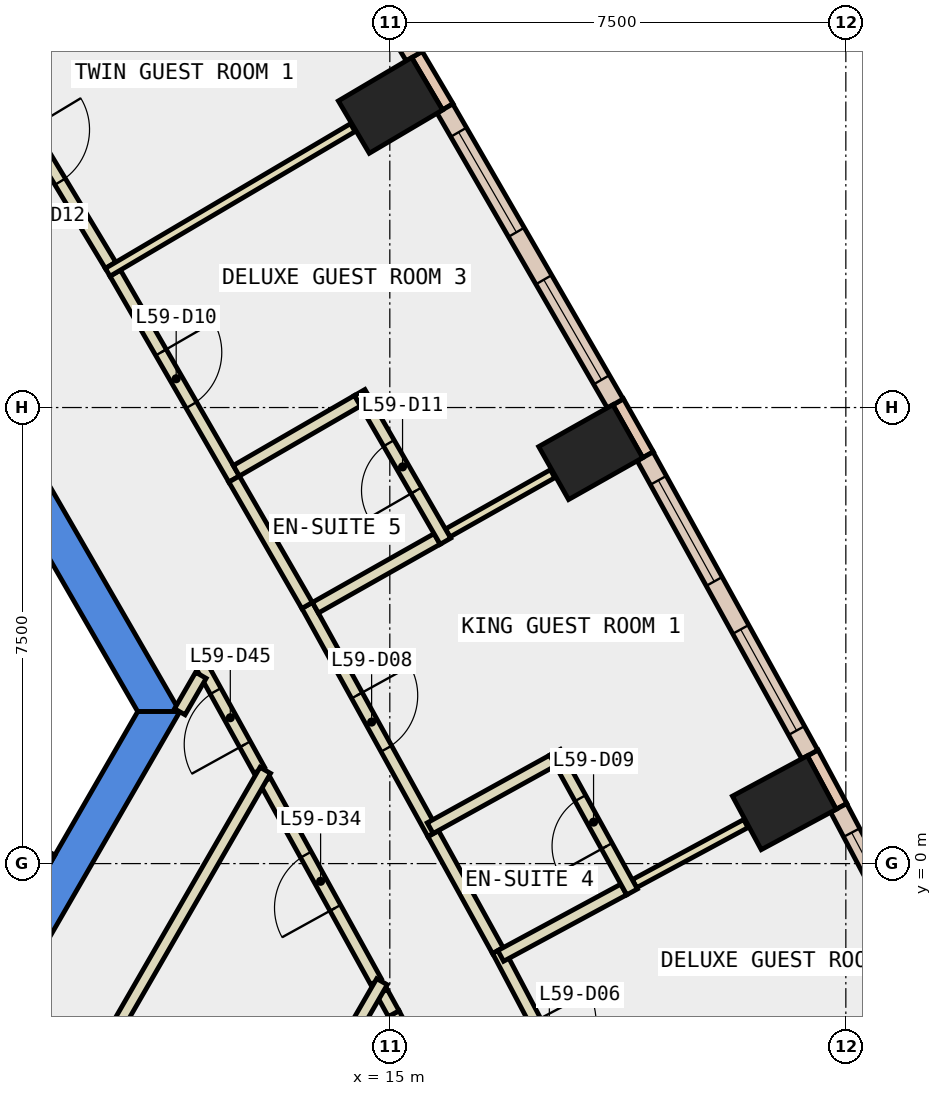
"""IFC4 building model, lengths in metres.
Left out: names, types, materials, properties, quantities, classifications, styles, units other than length and angle.
Written with IfcOpenShell. Run it as: python <this file> out.ifc"""

import sys

from ifc_helpers import new_model, si_unit, direction, frame, frame_2d, origin, origin_2d, place, context, subcontext, project, spatial, polyline, rectangle, outline, extrude, element, fill, save


model = new_model("IFC4")
c1 = context("Model", 3, precision=1e-05, world=origin(), true_north=direction((0.0, 1.0)))
c2 = subcontext(c1, "Body", "Model", "MODEL_VIEW")
j1 = project(units=[si_unit("LENGTHUNIT", "METRE"), si_unit("PLANEANGLEUNIT", "RADIAN")], contexts=[c1])
p1 = place(None, origin())
s1 = spatial("IfcSite", under=j1, at=p1, CompositionType="ELEMENT")
p2 = place(p1, origin())
s2 = spatial("IfcBuilding", under=s1, at=p2, CompositionType="ELEMENT")
p3 = place(p2, frame((0.0, 0.0, 259.4)))
s3 = spatial("IfcBuildingStorey", under=s2, at=p3, CompositionType="ELEMENT", Elevation=259.4)
for number, where, z_axis, x_axis in (
    (1, (21.488, 1.001, -0.34), (0.0, 0.0, 1.0), (-0.474, 0.881, 0.0)),
    (2, (18.304, 6.766, -0.34), (0.0, 0.0, 1.0), (-0.491, 0.871, 0.0)),
    (3, (15.011, 12.468, -0.34), (0.0, 0.0, 1.0), (-0.509, 0.861, 0.0)),
):
    element("IfcColumn", number, at=place(p3, frame(where, z_axis=z_axis, x_axis=x_axis)), inside=s3, PredefinedType="COLUMN", context=c2, shape_type="SweptSolid", body=[
        extrude(rectangle(XDim=1.0, YDim=1.4, at=origin_2d()), origin(), (0.0, 0.0, 1.0), 3.6),
    ])
p4 = place(p3, frame((0.0, 0.0, -0.34)))
e4 = element("IfcWall", 4, at=p4, inside=s3, PredefinedType="SHEAR", context=c2, shape_type="SweptSolid", body=[
    extrude(outline(polyline([(6.786, 10.747), (6.266, 10.447), (10.854, 2.5), (11.547, 2.5), (6.786, 10.747)])), origin(), (0.0, 0.0, 1.0), 3.6),
])
p5 = place(p3, frame((0.0, 0.0, -0.34)))
e5 = element("IfcWall", 5, at=p5, inside=s3, PredefinedType="SHEAR", context=c2, shape_type="SweptSolid", body=[
    extrude(outline(polyline([(5.774, -7.5), (11.547, 2.5), (10.854, 2.5), (5.427, -6.9), (5.774, -7.5)])), origin(), (0.0, 0.0, 1.0), 3.6),
])
for number, where, z_axis, x_axis in (
    (6, (22.429, 0.94, 0.0), (0.0, 0.0, 1.0), (-0.474, 0.881, 0.0)),
    (7, (19.247, 6.723, 0.0), (0.0, 0.0, 1.0), (-0.492, 0.871, 0.0)),
):
    element("IfcWall", number, at=place(p3, frame(where, z_axis=z_axis, x_axis=x_axis)), inside=s3, PredefinedType="STANDARD", context=c2, shape_type="SweptSolid", body=[
        extrude(rectangle(XDim=1.0, YDim=0.2, at=frame_2d((0.5, 0.0))), origin(), (0.0, 0.0, 1.0), 3.26),
    ])
p6 = place(p3, frame((15.954, 12.445, 0.0), z_axis=(0.0, 0.0, 1.0), x_axis=(-0.508268432768, 0.861198699634, 0.0)))
e8 = element("IfcWall", 8, at=p6, inside=s3, PredefinedType="STANDARD", context=c2, shape_type="SweptSolid", body=[
    extrude(rectangle(XDim=1.0, YDim=0.2, at=frame_2d((0.5, 0.0))), origin(), (0.0, 0.0, 1.0), 3.26),
])
p7 = place(p3, frame((25.012, -4.07, 0.0), z_axis=(0.0, 0.0, 1.0), x_axis=(-0.466663589714, 0.884434900959, 0.0)))
e9 = element("IfcWall", 9, at=p7, inside=s3, PredefinedType="STANDARD", context=c2, shape_type="SweptSolid", body=[
    extrude(rectangle(XDim=5.638, YDim=0.3, at=frame_2d((2.819, 0.0))), origin(), (0.0, 0.0, 1.0), 3.26),
])
p8 = place(p7, frame((0.459, 0.0, 0.9)))
e10 = element("IfcOpeningElement", 10, at=p8, cuts=e9, PredefinedType="OPENING", context=c2, shape_type="SweptSolid", body=[
    extrude(rectangle(XDim=1.9, YDim=2.0, at=frame_2d((0.95, 1.0))), frame((0.0, 0.16, 0.0), z_axis=(0.0, -1.0, 0.0), x_axis=(1.0, 0.0, 0.0)), (0.0, 0.0, 1.0), 0.32),
])
p9 = place(p7, frame((3.278, 0.0, 0.9)))
e11 = element("IfcOpeningElement", 11, at=p9, cuts=e9, PredefinedType="OPENING", context=c2, shape_type="SweptSolid", body=[
    extrude(rectangle(XDim=1.9, YDim=2.0, at=frame_2d((0.95, 1.0))), frame((0.0, 0.16, 0.0), z_axis=(0.0, -1.0, 0.0), x_axis=(1.0, 0.0, 0.0)), (0.0, 0.0, 1.0), 0.32),
])
p10 = place(p3, frame((21.907, 1.794, 0.0), z_axis=(0.0, 0.0, 1.0), x_axis=(-0.483469062695, 0.875361448441, 0.0)))
e12 = element("IfcWall", 12, at=p10, inside=s3, PredefinedType="STANDARD", context=c2, shape_type="SweptSolid", body=[
    extrude(rectangle(XDim=5.601, YDim=0.3, at=frame_2d((2.801, 0.0))), origin(), (0.0, 0.0, 1.0), 3.26),
])
p11 = place(p10, frame((0.45, 0.0, 0.9)))
e13 = element("IfcOpeningElement", 13, at=p11, cuts=e12, PredefinedType="OPENING", context=c2, shape_type="SweptSolid", body=[
    extrude(rectangle(XDim=1.9, YDim=2.0, at=frame_2d((0.95, 1.0))), frame((0.0, 0.16, 0.0), z_axis=(0.0, -1.0, 0.0), x_axis=(1.0, 0.0, 0.0)), (0.0, 0.0, 1.0), 0.32),
])
p12 = place(p10, frame((3.251, 0.0, 0.9)))
e14 = element("IfcOpeningElement", 14, at=p12, cuts=e12, PredefinedType="OPENING", context=c2, shape_type="SweptSolid", body=[
    extrude(rectangle(XDim=1.9, YDim=2.0, at=frame_2d((0.95, 1.0))), frame((0.0, 0.16, 0.0), z_axis=(0.0, -1.0, 0.0), x_axis=(1.0, 0.0, 0.0)), (0.0, 0.0, 1.0), 0.32),
])
p13 = place(p3, frame((18.708, 7.566, 0.0), z_axis=(0.0, 0.0, 1.0), x_axis=(-0.500089564757, 0.865973687372, 0.0)))
e15 = element("IfcWall", 15, at=p13, inside=s3, PredefinedType="STANDARD", context=c2, shape_type="SweptSolid", body=[
    extrude(rectangle(XDim=5.603, YDim=0.3, at=frame_2d((2.802, 0.0))), origin(), (0.0, 0.0, 1.0), 3.26),
])
p14 = place(p13, frame((0.451, 0.0, 0.9)))
e16 = element("IfcOpeningElement", 16, at=p14, cuts=e15, PredefinedType="OPENING", context=c2, shape_type="SweptSolid", body=[
    extrude(rectangle(XDim=1.9, YDim=2.0, at=frame_2d((0.95, 1.0))), frame((0.0, 0.16, 0.0), z_axis=(0.0, -1.0, 0.0), x_axis=(1.0, 0.0, 0.0)), (0.0, 0.0, 1.0), 0.32),
])
p15 = place(p13, frame((3.252, 0.0, 0.9)))
e17 = element("IfcOpeningElement", 17, at=p15, cuts=e15, PredefinedType="OPENING", context=c2, shape_type="SweptSolid", body=[
    extrude(rectangle(XDim=1.9, YDim=2.0, at=frame_2d((0.95, 1.0))), frame((0.0, 0.16, 0.0), z_axis=(0.0, -1.0, 0.0), x_axis=(1.0, 0.0, 0.0)), (0.0, 0.0, 1.0), 0.32),
])
p16 = place(p3, frame((15.399, 13.277, 0.0), z_axis=(0.0, 0.0, 1.0), x_axis=(-0.516269519619, 0.856426169096, 0.0)))
e18 = element("IfcWall", 18, at=p16, inside=s3, PredefinedType="STANDARD", context=c2, shape_type="SweptSolid", body=[
    extrude(rectangle(XDim=5.603, YDim=0.3, at=frame_2d((2.802, 0.0))), origin(), (0.0, 0.0, 1.0), 3.26),
])
p17 = place(p16, frame((0.451, 0.0, 0.9)))
e19 = element("IfcOpeningElement", 19, at=p17, cuts=e18, PredefinedType="OPENING", context=c2, shape_type="SweptSolid", body=[
    extrude(rectangle(XDim=1.9, YDim=2.0, at=frame_2d((0.95, 1.0))), frame((0.0, 0.16, 0.0), z_axis=(0.0, -1.0, 0.0), x_axis=(1.0, 0.0, 0.0)), (0.0, 0.0, 1.0), 0.32),
])
p18 = place(p16, frame((3.253, 0.0, 0.9)))
e20 = element("IfcOpeningElement", 20, at=p18, cuts=e18, PredefinedType="OPENING", context=c2, shape_type="SweptSolid", body=[
    extrude(rectangle(XDim=1.9, YDim=2.0, at=frame_2d((0.95, 1.0))), frame((0.0, 0.16, 0.0), z_axis=(0.0, -1.0, 0.0), x_axis=(1.0, 0.0, 0.0)), (0.0, 0.0, 1.0), 0.32),
])
p19 = place(p3, frame((12.854, 1.535, 0.0), z_axis=(0.0, 0.0, 1.0), x_axis=(-0.483730980407, 0.875216738068, 0.0)))
e21 = element("IfcWall", 21, at=p19, inside=s3, PredefinedType="PARTITIONING", context=c2, shape_type="SweptSolid", body=[
    extrude(rectangle(XDim=1.974, YDim=0.2, at=frame_2d((0.987, 0.0))), origin(), (0.0, 0.0, 1.0), 3.26),
])
p20 = place(p19, frame((0.487, 0.0, 0.0)))
e22 = element("IfcOpeningElement", 22, at=p20, cuts=e21, PredefinedType="OPENING", context=c2, shape_type="SweptSolid", body=[
    extrude(rectangle(XDim=1.0, YDim=2.1, at=frame_2d((0.5, 1.05))), frame((0.0, 0.11, 0.0), z_axis=(0.0, -1.0, 0.0), x_axis=(1.0, 0.0, 0.0)), (0.0, 0.0, 1.0), 0.22),
])
p21 = place(p3, frame((11.893, 3.097, 0.0), z_axis=(0.0, 0.0, 1.0), x_axis=(-0.500911294014, -0.865498628265, 0.0)))
e23 = element("IfcWall", 23, at=p21, inside=s3, PredefinedType="PARTITIONING", context=c2, shape_type="SweptSolid", body=[
    extrude(rectangle(XDim=0.693, YDim=0.2, at=frame_2d((0.347, 0.0))), origin(), (0.0, 0.0, 1.0), 3.26),
])
p22 = place(p3, frame((14.773, -1.941, 0.0), z_axis=(0.0, 0.0, 1.0), x_axis=(-0.483431586589, 0.875382145744, 0.0)))
e24 = element("IfcWall", 24, at=p22, inside=s3, PredefinedType="PARTITIONING", context=c2, shape_type="SweptSolid", body=[
    extrude(rectangle(XDim=3.771, YDim=0.2, at=frame_2d((1.885, 0.0))), origin(), (0.0, 0.0, 1.0), 3.26),
])
p23 = place(p22, frame((1.385, 0.0, 0.0)))
e25 = element("IfcOpeningElement", 25, at=p23, cuts=e24, PredefinedType="OPENING", context=c2, shape_type="SweptSolid", body=[
    extrude(rectangle(XDim=1.0, YDim=2.1, at=frame_2d((0.5, 1.05))), frame((0.0, 0.11, 0.0), z_axis=(0.0, -1.0, 0.0), x_axis=(1.0, 0.0, 0.0)), (0.0, 0.0, 1.0), 0.22),
])
p24 = place(p3, frame((16.667, -5.505, 0.0), z_axis=(0.0, 0.0, 1.0), x_axis=(-0.466812680399, 0.884356218624, 0.0)))
e26 = element("IfcWall", 26, at=p24, inside=s3, PredefinedType="PARTITIONING", context=c2, shape_type="SweptSolid", body=[
    extrude(rectangle(XDim=3.434, YDim=0.2, at=frame_2d((1.717, 0.0))), origin(), (0.0, 0.0, 1.0), 3.26),
])
p25 = place(p24, frame((1.217, 0.0, 0.0)))
e27 = element("IfcOpeningElement", 27, at=p25, cuts=e26, PredefinedType="OPENING", context=c2, shape_type="SweptSolid", body=[
    extrude(rectangle(XDim=1.0, YDim=2.1, at=frame_2d((0.5, 1.05))), frame((0.0, 0.11, 0.0), z_axis=(0.0, -1.0, 0.0), x_axis=(1.0, 0.0, 0.0)), (0.0, 0.0, 1.0), 0.22),
])
p26 = place(p3, frame((15.064, -2.468, 0.0), z_axis=(0.0, 0.0, 1.0), x_axis=(-0.482338449744, 0.875984942735, 0.0)))
e28 = element("IfcWall", 28, at=p26, inside=s3, PredefinedType="PARTITIONING", context=c2, shape_type="SweptSolid", body=[
    extrude(rectangle(XDim=0.402, YDim=0.2, at=frame_2d((0.201, 0.0))), origin(), (0.0, 0.0, 1.0), 3.26),
])
p27 = place(p3, frame((16.778, -1.429, 0.0), z_axis=(0.0, 0.0, 1.0), x_axis=(0.466493865945, -0.884524433261, 0.0)))
e29 = element("IfcWall", 29, at=p27, inside=s3, PredefinedType="PARTITIONING", context=c2, shape_type="SweptSolid", body=[
    extrude(rectangle(XDim=3.526, YDim=0.2, at=frame_2d((1.763, 0.0))), origin(), (0.0, 0.0, 1.0), 3.26),
])
p28 = place(p27, frame((1.313, 0.0, 0.0)))
e30 = element("IfcOpeningElement", 30, at=p28, cuts=e29, PredefinedType="OPENING", context=c2, shape_type="SweptSolid", body=[
    extrude(rectangle(XDim=1.0, YDim=2.1, at=frame_2d((0.5, 1.05))), frame((0.0, 0.11, 0.0), z_axis=(0.0, -1.0, 0.0), x_axis=(1.0, 0.0, 0.0)), (0.0, 0.0, 1.0), 0.22),
])
p29 = place(p3, frame((13.641, 4.246, 0.0), z_axis=(0.0, 0.0, 1.0), x_axis=(0.483405752983, -0.875396411909, 0.0)))
e31 = element("IfcWall", 31, at=p29, inside=s3, PredefinedType="PARTITIONING", context=c2, shape_type="SweptSolid", body=[
    extrude(rectangle(XDim=4.284, YDim=0.2, at=frame_2d((2.142, 0.0))), origin(), (0.0, 0.0, 1.0), 3.26),
])
p30 = place(p29, frame((1.692, 0.0, 0.0)))
e32 = element("IfcOpeningElement", 32, at=p30, cuts=e31, PredefinedType="OPENING", context=c2, shape_type="SweptSolid", body=[
    extrude(rectangle(XDim=1.0, YDim=2.1, at=frame_2d((0.5, 1.05))), frame((0.0, 0.11, 0.0), z_axis=(0.0, -1.0, 0.0), x_axis=(1.0, 0.0, 0.0)), (0.0, 0.0, 1.0), 0.22),
])
p31 = place(p3, frame((15.715, 0.491, 0.0), z_axis=(0.0, 0.0, 1.0), x_axis=(0.483421428323, -0.875387755591, 0.0)))
e33 = element("IfcWall", 33, at=p31, inside=s3, PredefinedType="PARTITIONING", context=c2, shape_type="SweptSolid", body=[
    extrude(rectangle(XDim=2.194, YDim=0.2, at=frame_2d((1.097, 0.0))), origin(), (0.0, 0.0, 1.0), 3.26),
])
p32 = place(p3, frame((10.484, 9.71, 0.0), z_axis=(0.0, 0.0, 1.0), x_axis=(0.500034145141, -0.866005689181, 0.0)))
e34 = element("IfcWall", 34, at=p32, inside=s3, PredefinedType="PARTITIONING", context=c2, shape_type="SweptSolid", body=[
    extrude(rectangle(XDim=3.91, YDim=0.2, at=frame_2d((1.955, 0.0))), origin(), (0.0, 0.0, 1.0), 3.26),
])
p33 = place(p32, frame((1.505, 0.0, 0.0)))
e35 = element("IfcOpeningElement", 35, at=p33, cuts=e34, PredefinedType="OPENING", context=c2, shape_type="SweptSolid", body=[
    extrude(rectangle(XDim=1.0, YDim=2.1, at=frame_2d((0.5, 1.05))), frame((0.0, 0.11, 0.0), z_axis=(0.0, -1.0, 0.0), x_axis=(1.0, 0.0, 0.0)), (0.0, 0.0, 1.0), 0.22),
])
p34 = place(p3, frame((12.439, 6.324, 0.0), z_axis=(0.0, 0.0, 1.0), x_axis=(0.499913221443, -0.866075499611, 0.0)))
e36 = element("IfcWall", 36, at=p34, inside=s3, PredefinedType="PARTITIONING", context=c2, shape_type="SweptSolid", body=[
    extrude(rectangle(XDim=2.4, YDim=0.2, at=frame_2d((1.2, 0.0))), origin(), (0.0, 0.0, 1.0), 3.26),
])
p35 = place(p3, frame((8.181, 13.532, 0.0), z_axis=(0.0, 0.0, 1.0), x_axis=(0.51625987265, -0.856431984393, 0.0)))
e37 = element("IfcWall", 37, at=p35, inside=s3, PredefinedType="PARTITIONING", context=c2, shape_type="SweptSolid", body=[
    extrude(rectangle(XDim=4.312, YDim=0.2, at=frame_2d((2.156, 0.0))), origin(), (0.0, 0.0, 1.0), 3.26),
])
p36 = place(p35, frame((1.706, 0.0, 0.0)))
e38 = element("IfcOpeningElement", 38, at=p36, cuts=e37, PredefinedType="OPENING", context=c2, shape_type="SweptSolid", body=[
    extrude(rectangle(XDim=1.0, YDim=2.1, at=frame_2d((0.5, 1.05))), frame((0.0, 0.11, 0.0), z_axis=(0.0, -1.0, 0.0), x_axis=(1.0, 0.0, 0.0)), (0.0, 0.0, 1.0), 0.22),
])
p37 = place(p3, frame((8.141, 0.801, 0.0), z_axis=(0.0, 0.0, 1.0), x_axis=(0.866434738017, -0.499290341141, 0.0)))
e39 = element("IfcWall", 39, at=p37, inside=s3, PredefinedType="PARTITIONING", context=c2, shape_type="SweptSolid", body=[
    extrude(rectangle(XDim=1.5, YDim=0.2, at=frame_2d((0.75, 0.0))), origin(), (0.0, 0.0, 1.0), 3.26),
])
p38 = place(p3, frame((9.285, -4.818, 0.0), z_axis=(0.0, 0.0, 1.0), x_axis=(0.499962569651, 0.866047013128, 0.0)))
e40 = element("IfcWall", 40, at=p38, inside=s3, PredefinedType="PARTITIONING", context=c2, shape_type="SweptSolid", body=[
    extrude(rectangle(XDim=7.334, YDim=0.2, at=frame_2d((3.667, 0.0))), origin(), (0.0, 0.0, 1.0), 3.26),
])
p39 = place(p3, frame((14.871, -1.942, 0.0), z_axis=(0.0, 0.0, 1.0), x_axis=(-0.50000507839, -0.866022471755, 0.0)))
e41 = element("IfcWall", 41, at=p39, inside=s3, PredefinedType="PARTITIONING", context=c2, shape_type="SweptSolid", body=[
    extrude(rectangle(XDim=5.284, YDim=0.2, at=frame_2d((2.642, 0.0))), origin(), (0.0, 0.0, 1.0), 3.26),
])
p40 = place(p3, frame((19.023, -0.33, 0.0), z_axis=(0.0, 0.0, 1.0), x_axis=(0.880158309515, 0.474680261009, 0.0)))
e42 = element("IfcWall", 42, at=p40, inside=s3, PredefinedType="PARTITIONING", context=c2, shape_type="SweptSolid", body=[
    extrude(rectangle(XDim=2.082, YDim=0.15, at=frame_2d((1.041, 0.0))), origin(), (0.0, 0.0, 1.0), 3.26),
])
p41 = place(p3, frame((16.824, -1.518, 0.0), z_axis=(0.0, 0.0, 1.0), x_axis=(0.87996932648, 0.475030508972, 0.0)))
e43 = element("IfcWall", 43, at=p41, inside=s3, PredefinedType="PARTITIONING", context=c2, shape_type="SweptSolid", body=[
    extrude(rectangle(XDim=2.299, YDim=0.2, at=frame_2d((1.149, 0.0))), origin(), (0.0, 0.0, 1.0), 3.26),
])
p42 = place(p3, frame((18.984, -0.466, 0.0), z_axis=(0.0, 0.0, 1.0), x_axis=(-0.482922337539, 0.875663186337, 0.0)))
e44 = element("IfcWall", 44, at=p42, inside=s3, PredefinedType="PARTITIONING", context=c2, shape_type="SweptSolid", body=[
    extrude(rectangle(XDim=2.623, YDim=0.2, at=frame_2d((1.312, 0.0))), origin(), (0.0, 0.0, 1.0), 3.26),
])
p43 = place(p42, frame((0.861, 0.0, 0.0)))
e45 = element("IfcOpeningElement", 45, at=p43, cuts=e44, PredefinedType="OPENING", context=c2, shape_type="SweptSolid", body=[
    extrude(rectangle(XDim=0.9, YDim=2.1, at=frame_2d((0.45, 1.05))), frame((0.0, 0.11, 0.0), z_axis=(0.0, -1.0, 0.0), x_axis=(1.0, 0.0, 0.0)), (0.0, 0.0, 1.0), 0.22),
])
p44 = place(p3, frame((17.677, 1.695, 0.0), z_axis=(0.0, 0.0, 1.0), x_axis=(-0.875306576455, -0.483568399727, 0.0)))
e46 = element("IfcWall", 46, at=p44, inside=s3, PredefinedType="PARTITIONING", context=c2, shape_type="SweptSolid", body=[
    extrude(rectangle(XDim=2.3, YDim=0.2, at=frame_2d((1.15, 0.0))), origin(), (0.0, 0.0, 1.0), 3.26),
])
p45 = place(p3, frame((15.952, 5.437, 0.0), z_axis=(0.0, 0.0, 1.0), x_axis=(0.870817501488, 0.491606427036, 0.0)))
e47 = element("IfcWall", 47, at=p45, inside=s3, PredefinedType="PARTITIONING", context=c2, shape_type="SweptSolid", body=[
    extrude(rectangle(XDim=1.981, YDim=0.15, at=frame_2d((0.99, 0.0))), origin(), (0.0, 0.0, 1.0), 3.26),
])
p46 = place(p3, frame((13.776, 4.208, 0.0), z_axis=(0.0, 0.0, 1.0), x_axis=(0.870669592898, 0.491868336044, 0.0)))
e48 = element("IfcWall", 48, at=p46, inside=s3, PredefinedType="PARTITIONING", context=c2, shape_type="SweptSolid", body=[
    extrude(rectangle(XDim=2.3, YDim=0.2, at=frame_2d((1.15, 0.0))), origin(), (0.0, 0.0, 1.0), 3.26),
])
p47 = place(p3, frame((15.915, 5.301, 0.0), z_axis=(0.0, 0.0, 1.0), x_axis=(-0.499709979351, 0.866192782547, 0.0)))
e49 = element("IfcWall", 49, at=p47, inside=s3, PredefinedType="PARTITIONING", context=c2, shape_type="SweptSolid", body=[
    extrude(rectangle(XDim=2.824, YDim=0.2, at=frame_2d((1.412, 0.0))), origin(), (0.0, 0.0, 1.0), 3.26),
])
p48 = place(p47, frame((0.962, 0.0, 0.0)))
e50 = element("IfcOpeningElement", 50, at=p48, cuts=e49, PredefinedType="OPENING", context=c2, shape_type="SweptSolid", body=[
    extrude(rectangle(XDim=0.9, YDim=2.1, at=frame_2d((0.45, 1.05))), frame((0.0, 0.11, 0.0), z_axis=(0.0, -1.0, 0.0), x_axis=(1.0, 0.0, 0.0)), (0.0, 0.0, 1.0), 0.22),
])
p49 = place(p3, frame((14.467, 7.611, 0.0), z_axis=(0.0, 0.0, 1.0), x_axis=(-0.865716862402, -0.500534028967, 0.0)))
e51 = element("IfcWall", 51, at=p49, inside=s3, PredefinedType="PARTITIONING", context=c2, shape_type="SweptSolid", body=[
    extrude(rectangle(XDim=2.3, YDim=0.2, at=frame_2d((1.15, 0.0))), origin(), (0.0, 0.0, 1.0), 3.26),
])
p50 = place(p3, frame((10.36, 9.724, 0.0), z_axis=(0.0, 0.0, 1.0), x_axis=(0.861211954005, 0.508245974188, 0.0)))
e52 = element("IfcWall", 52, at=p50, inside=s3, PredefinedType="PARTITIONING", context=c2, shape_type="SweptSolid", body=[
    extrude(rectangle(XDim=4.681, YDim=0.15, at=frame_2d((2.34, 0.0))), origin(), (0.0, 0.0, 1.0), 3.26),
])
p51 = place(p9, origin())
e53 = element("IfcWindow", 53, at=p51, inside=s3, PartitioningType="SINGLE_PANEL", PredefinedType="WINDOW", context=c2, shape_type="SweptSolid", body=[
    extrude(rectangle(XDim=1.9, YDim=2.0, at=frame_2d((0.95, 1.0))), frame((0.0, 0.03, 0.0), z_axis=(0.0, -1.0, 0.0), x_axis=(1.0, 0.0, 0.0)), (0.0, 0.0, 1.0), 0.06),
])
fill(e11, e53)
p52 = place(p11, origin())
e54 = element("IfcWindow", 54, at=p52, inside=s3, PartitioningType="SINGLE_PANEL", PredefinedType="WINDOW", context=c2, shape_type="SweptSolid", body=[
    extrude(rectangle(XDim=1.9, YDim=2.0, at=frame_2d((0.95, 1.0))), frame((0.0, 0.03, 0.0), z_axis=(0.0, -1.0, 0.0), x_axis=(1.0, 0.0, 0.0)), (0.0, 0.0, 1.0), 0.06),
])
fill(e13, e54)
p53 = place(p12, origin())
e55 = element("IfcWindow", 55, at=p53, inside=s3, PartitioningType="SINGLE_PANEL", PredefinedType="WINDOW", context=c2, shape_type="SweptSolid", body=[
    extrude(rectangle(XDim=1.9, YDim=2.0, at=frame_2d((0.95, 1.0))), frame((0.0, 0.03, 0.0), z_axis=(0.0, -1.0, 0.0), x_axis=(1.0, 0.0, 0.0)), (0.0, 0.0, 1.0), 0.06),
])
fill(e14, e55)
p54 = place(p14, origin())
e56 = element("IfcWindow", 56, at=p54, inside=s3, PartitioningType="SINGLE_PANEL", PredefinedType="WINDOW", context=c2, shape_type="SweptSolid", body=[
    extrude(rectangle(XDim=1.9, YDim=2.0, at=frame_2d((0.95, 1.0))), frame((0.0, 0.03, 0.0), z_axis=(0.0, -1.0, 0.0), x_axis=(1.0, 0.0, 0.0)), (0.0, 0.0, 1.0), 0.06),
])
fill(e16, e56)
p55 = place(p15, origin())
e57 = element("IfcWindow", 57, at=p55, inside=s3, PartitioningType="SINGLE_PANEL", PredefinedType="WINDOW", context=c2, shape_type="SweptSolid", body=[
    extrude(rectangle(XDim=1.9, YDim=2.0, at=frame_2d((0.95, 1.0))), frame((0.0, 0.03, 0.0), z_axis=(0.0, -1.0, 0.0), x_axis=(1.0, 0.0, 0.0)), (0.0, 0.0, 1.0), 0.06),
])
fill(e17, e57)
p56 = place(p30, origin())
e58 = element("IfcDoor", 58, at=p56, inside=s3, OperationType="SINGLE_SWING_RIGHT", PredefinedType="DOOR", context=c2, shape_type="SweptSolid", body=[
    extrude(rectangle(XDim=1.0, YDim=2.1, at=frame_2d((0.5, 1.05))), frame((0.0, 0.025, 0.0), z_axis=(0.0, -1.0, 0.0), x_axis=(1.0, 0.0, 0.0)), (0.0, 0.0, 1.0), 0.05),
])
fill(e32, e58)
p57 = place(p43, origin())
e59 = element("IfcDoor", 59, at=p57, inside=s3, OperationType="SINGLE_SWING_LEFT", PredefinedType="DOOR", context=c2, shape_type="SweptSolid", body=[
    extrude(rectangle(XDim=0.9, YDim=2.1, at=frame_2d((0.45, 1.05))), frame((0.0, 0.025, 0.0), z_axis=(0.0, -1.0, 0.0), x_axis=(1.0, 0.0, 0.0)), (0.0, 0.0, 1.0), 0.05),
])
fill(e45, e59)
p58 = place(p33, origin())
e60 = element("IfcDoor", 60, at=p58, inside=s3, OperationType="SINGLE_SWING_LEFT", PredefinedType="DOOR", context=c2, shape_type="SweptSolid", body=[
    extrude(rectangle(XDim=1.0, YDim=2.1, at=frame_2d((0.5, 1.05))), frame((0.0, 0.025, 0.0), z_axis=(0.0, -1.0, 0.0), x_axis=(1.0, 0.0, 0.0)), (0.0, 0.0, 1.0), 0.05),
])
fill(e35, e60)
p59 = place(p48, origin())
e61 = element("IfcDoor", 61, at=p59, inside=s3, OperationType="SINGLE_SWING_LEFT", PredefinedType="DOOR", context=c2, shape_type="SweptSolid", body=[
    extrude(rectangle(XDim=0.9, YDim=2.1, at=frame_2d((0.45, 1.05))), frame((0.0, 0.025, 0.0), z_axis=(0.0, -1.0, 0.0), x_axis=(1.0, 0.0, 0.0)), (0.0, 0.0, 1.0), 0.05),
])
fill(e50, e61)
p60 = place(p36, origin())
e62 = element("IfcDoor", 62, at=p60, inside=s3, OperationType="SINGLE_SWING_LEFT", PredefinedType="DOOR", context=c2, shape_type="SweptSolid", body=[
    extrude(rectangle(XDim=1.0, YDim=2.1, at=frame_2d((0.5, 1.05))), frame((0.0, 0.025, 0.0), z_axis=(0.0, -1.0, 0.0), x_axis=(1.0, 0.0, 0.0)), (0.0, 0.0, 1.0), 0.05),
])
fill(e38, e62)
p61 = place(p23, origin())
e63 = element("IfcDoor", 63, at=p61, inside=s3, OperationType="SINGLE_SWING_LEFT", PredefinedType="DOOR", context=c2, shape_type="SweptSolid", body=[
    extrude(rectangle(XDim=1.0, YDim=2.1, at=frame_2d((0.5, 1.05))), frame((0.0, 0.025, 0.0), z_axis=(0.0, -1.0, 0.0), x_axis=(1.0, 0.0, 0.0)), (0.0, 0.0, 1.0), 0.05),
])
fill(e25, e63)
p62 = place(p20, origin())
e64 = element("IfcDoor", 64, at=p62, inside=s3, OperationType="SINGLE_SWING_LEFT", PredefinedType="DOOR", context=c2, shape_type="SweptSolid", body=[
    extrude(rectangle(XDim=1.0, YDim=2.1, at=frame_2d((0.5, 1.05))), frame((0.0, 0.025, 0.0), z_axis=(0.0, -1.0, 0.0), x_axis=(1.0, 0.0, 0.0)), (0.0, 0.0, 1.0), 0.05),
])
fill(e22, e64)
save(model, sys.argv[1])
